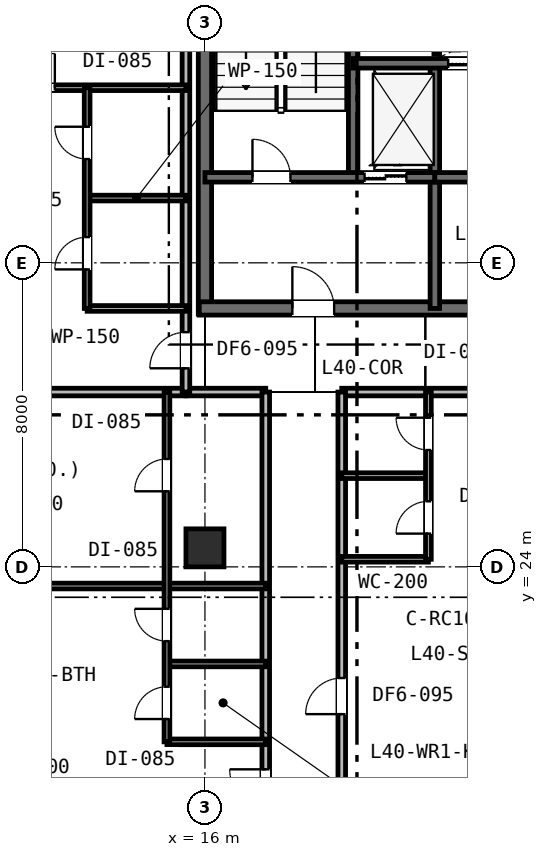
"""IFC4 building model, lengths in metres.
Left out: names, types, materials, properties, quantities, classifications, styles, units other than length and angle.
Written with IfcOpenShell. Run it as: python <this file> out.ifc"""

import sys

from ifc_helpers import new_model, si_unit, direction, frame, frame_2d, origin, origin_2d, place, context, subcontext, project, spatial, rectangle, extrude, element, fill, save


model = new_model("IFC4")
c1 = context("Model", 3, precision=1e-05, world=origin(), true_north=direction((0.0, 1.0)))
c2 = subcontext(c1, "Body", "Model", "MODEL_VIEW")
j1 = project(units=[si_unit("LENGTHUNIT", "METRE"), si_unit("PLANEANGLEUNIT", "RADIAN")], contexts=[c1])
p1 = place(None, origin())
s1 = spatial("IfcSite", under=j1, at=p1, CompositionType="ELEMENT")
p2 = place(p1, origin())
s2 = spatial("IfcBuilding", under=s1, at=p2, CompositionType="ELEMENT")
p3 = place(p2, frame((0.0, 0.0, 157.8)))
s3 = spatial("IfcBuildingStorey", under=s2, at=p3, CompositionType="ELEMENT", Elevation=157.8)
p4 = place(p3, frame((16.0, 30.65, 0.0), z_axis=(0.0, 0.0, 1.0), x_axis=(0.0, 1.0, 0.0)))
e1 = element("IfcWall", 1, at=p4, inside=s3, PredefinedType="SHEAR", context=c2, shape_type="SweptSolid", body=[
    extrude(rectangle(XDim=12.3, YDim=0.35, at=frame_2d((6.15, 0.0))), origin(), (0.0, 0.0, 1.0), 3.6),
])
p5 = place(p3, frame((15.85, 30.8, 0.0), z_axis=(0.0, 0.0, 1.0), x_axis=(1.0, 0.0, 0.0)))
e2 = element("IfcWall", 2, at=p5, inside=s3, PredefinedType="SHEAR", context=c2, shape_type="SweptSolid", body=[
    extrude(rectangle(XDim=11.2, YDim=0.35, at=frame_2d((5.6, 0.0))), origin(), (0.0, 0.0, 1.0), 3.6),
])
p6 = place(p5, frame((2.45, 0.0, 0.0)))
e3 = element("IfcOpeningElement", 3, at=p6, cuts=e2, PredefinedType="OPENING", context=c2, shape_type="SweptSolid", body=[
    extrude(rectangle(XDim=1.1, YDim=2.15, at=frame_2d((0.55, 1.075))), frame((0.0, 0.185, 0.0), z_axis=(0.0, -1.0, 0.0), x_axis=(1.0, 0.0, 0.0)), (0.0, 0.0, 1.0), 0.37),
])
p7 = place(p3, frame((19.9, 34.25, 0.0), z_axis=(0.0, 0.0, 1.0), x_axis=(0.0, 1.0, 0.0)))
e4 = element("IfcWall", 4, at=p7, inside=s3, PredefinedType="SHEAR", context=c2, shape_type="SweptSolid", body=[
    extrude(rectangle(XDim=8.65, YDim=0.25, at=frame_2d((4.325, 0.0))), origin(), (0.0, 0.0, 1.0), 3.6),
])
p8 = place(p3, frame((22.05, 30.8, 0.0), z_axis=(0.0, 0.0, 1.0), x_axis=(0.0, 1.0, 0.0)))
e5 = element("IfcWall", 5, at=p8, inside=s3, PredefinedType="SHEAR", context=c2, shape_type="SweptSolid", body=[
    extrude(rectangle(XDim=6.45, YDim=0.25, at=frame_2d((3.225, 0.0))), origin(), (0.0, 0.0, 1.0), 3.6),
])
p9 = place(p3, frame((16.0, 34.25, 0.0), z_axis=(0.0, 0.0, 1.0), x_axis=(1.0, 0.0, 0.0)))
e6 = element("IfcWall", 6, at=p9, inside=s3, PredefinedType="SHEAR", context=c2, shape_type="SweptSolid", body=[
    extrude(rectangle(XDim=6.05, YDim=0.25, at=frame_2d((3.025, 0.0))), origin(), (0.0, 0.0, 1.0), 3.6),
])
p10 = place(p9, frame((1.25, 0.0, 0.0)))
e7 = element("IfcOpeningElement", 7, at=p10, cuts=e6, PredefinedType="OPENING", context=c2, shape_type="SweptSolid", body=[
    extrude(rectangle(XDim=1.0, YDim=2.15, at=frame_2d((0.5, 1.075))), frame((0.0, 0.135, 0.0), z_axis=(0.0, -1.0, 0.0), x_axis=(1.0, 0.0, 0.0)), (0.0, 0.0, 1.0), 0.27),
])
p11 = place(p9, frame((4.2, 0.0, 0.0)))
e8 = element("IfcOpeningElement", 8, at=p11, cuts=e6, PredefinedType="OPENING", context=c2, shape_type="SweptSolid", body=[
    extrude(rectangle(XDim=1.1, YDim=2.15, at=frame_2d((0.55, 1.075))), frame((0.0, 0.135, 0.0), z_axis=(0.0, -1.0, 0.0), x_axis=(1.0, 0.0, 0.0)), (0.0, 0.0, 1.0), 0.27),
])
p12 = place(p3, frame((22.05, 34.25, 0.0), z_axis=(0.0, 0.0, 1.0), x_axis=(1.0, 0.0, 0.0)))
e9 = element("IfcWall", 9, at=p12, inside=s3, PredefinedType="SHEAR", context=c2, shape_type="SweptSolid", body=[
    extrude(rectangle(XDim=5.0, YDim=0.25, at=frame_2d((2.5, 0.0))), origin(), (0.0, 0.0, 1.0), 3.6),
])
p13 = place(p12, frame((1.95, 0.0, 0.0)))
e10 = element("IfcOpeningElement", 10, at=p13, cuts=e9, PredefinedType="OPENING", context=c2, shape_type="SweptSolid", body=[
    extrude(rectangle(XDim=1.0, YDim=2.15, at=frame_2d((0.5, 1.075))), frame((0.0, 0.135, 0.0), z_axis=(0.0, -1.0, 0.0), x_axis=(1.0, 0.0, 0.0)), (0.0, 0.0, 1.0), 0.27),
])
p14 = place(p3, frame((19.9, 37.25, 0.0), z_axis=(0.0, 0.0, 1.0), x_axis=(1.0, 0.0, 0.0)))
e11 = element("IfcWall", 11, at=p14, inside=s3, PredefinedType="SHEAR", context=c2, shape_type="SweptSolid", body=[
    extrude(rectangle(XDim=16.2, YDim=0.25, at=frame_2d((8.1, 0.0))), origin(), (0.0, 0.0, 1.0), 3.6),
])
p15 = place(p14, frame((12.55, 0.0, 0.0)))
e12 = element("IfcOpeningElement", 12, at=p15, cuts=e11, PredefinedType="OPENING", context=c2, shape_type="SweptSolid", body=[
    extrude(rectangle(XDim=0.9, YDim=2.15, at=frame_2d((0.45, 1.075))), frame((0.0, 0.135, 0.0), z_axis=(0.0, -1.0, 0.0), x_axis=(1.0, 0.0, 0.0)), (0.0, 0.0, 1.0), 0.27),
])
p16 = place(p14, frame((2.5, 0.0, 0.0)))
e13 = element("IfcOpeningElement", 13, at=p16, cuts=e11, PredefinedType="OPENING", context=c2, shape_type="SweptSolid", body=[
    extrude(rectangle(XDim=1.05, YDim=2.15, at=frame_2d((0.525, 1.075))), frame((0.0, 0.135, 0.0), z_axis=(0.0, -1.0, 0.0), x_axis=(1.0, 0.0, 0.0)), (0.0, 0.0, 1.0), 0.27),
])
p17 = place(p14, frame((4.4, 0.0, 0.0)))
e14 = element("IfcOpeningElement", 14, at=p17, cuts=e11, PredefinedType="OPENING", context=c2, shape_type="SweptSolid", body=[
    extrude(rectangle(XDim=1.05, YDim=2.15, at=frame_2d((0.525, 1.075))), frame((0.0, 0.135, 0.0), z_axis=(0.0, -1.0, 0.0), x_axis=(1.0, 0.0, 0.0)), (0.0, 0.0, 1.0), 0.27),
])
p18 = place(p14, frame((6.3, 0.0, 0.0)))
e15 = element("IfcOpeningElement", 15, at=p18, cuts=e11, PredefinedType="OPENING", context=c2, shape_type="SweptSolid", body=[
    extrude(rectangle(XDim=1.05, YDim=2.15, at=frame_2d((0.525, 1.075))), frame((0.0, 0.135, 0.0), z_axis=(0.0, -1.0, 0.0), x_axis=(1.0, 0.0, 0.0)), (0.0, 0.0, 1.0), 0.27),
])
p19 = place(p3, frame((16.0, 24.5, 0.0), z_axis=(0.0, 0.0, 1.0), x_axis=(1.0, 0.0, 0.0)))
e16 = element("IfcColumn", 16, at=p19, inside=s3, PredefinedType="COLUMN", context=c2, shape_type="SweptSolid", body=[
    extrude(rectangle(XDim=1.0, YDim=1.0, at=origin_2d()), origin(), (0.0, 0.0, 1.0), 3.6),
])
p20 = place(p3, frame((22.1, 37.49, 0.0), z_axis=(0.0, 0.0, 1.0), x_axis=(0.0, 1.0, 0.0)))
e17 = element("IfcWall", 17, at=p20, inside=s3, PredefinedType="PLUMBINGWALL", context=c2, shape_type="SweptSolid", body=[
    extrude(rectangle(XDim=2.56, YDim=0.15, at=frame_2d((1.28, 0.0))), origin(), (0.0, 0.0, 1.0), 3.33),
])
p21 = place(p3, frame((5.1, 28.6, 0.0), z_axis=(0.0, 0.0, 1.0), x_axis=(1.0, 0.0, 0.0)))
e18 = element("IfcWall", 18, at=p21, inside=s3, PredefinedType="PARTITIONING", context=c2, shape_type="SweptSolid", body=[
    extrude(rectangle(XDim=10.4, YDim=0.2, at=frame_2d((5.2, 0.0))), origin(), (0.0, 0.0, 1.0), 2.93),
])
p22 = place(p3, frame((15.5, 28.6, 0.0), z_axis=(0.0, 0.0, 1.0), x_axis=(1.0, 0.0, 0.0)))
e19 = element("IfcWall", 19, at=p22, inside=s3, PredefinedType="PARTITIONING", context=c2, shape_type="SweptSolid", body=[
    extrude(rectangle(XDim=2.1, YDim=0.2, at=frame_2d((1.05, 0.0))), origin(), (0.0, 0.0, 1.0), 2.93),
])
p23 = place(p3, frame((19.6, 28.6, 0.0), z_axis=(0.0, 0.0, 1.0), x_axis=(1.0, 0.0, 0.0)))
e20 = element("IfcWall", 20, at=p23, inside=s3, PredefinedType="PARTITIONING", context=c2, shape_type="SweptSolid", body=[
    extrude(rectangle(XDim=31.3, YDim=0.2, at=frame_2d((15.65, 0.0))), origin(), (0.0, 0.0, 1.0), 2.93),
])
p24 = place(p23, frame((5.445, 0.0, 0.0)))
e21 = element("IfcOpeningElement", 21, at=p24, cuts=e20, PredefinedType="OPENING", context=c2, shape_type="SweptSolid", body=[
    extrude(rectangle(XDim=0.95, YDim=2.15, at=frame_2d((0.475, 1.075))), frame((0.0, 0.11, 0.0), z_axis=(0.0, -1.0, 0.0), x_axis=(1.0, 0.0, 0.0)), (0.0, 0.0, 1.0), 0.22),
])
p25 = place(p23, frame((13.35, 0.0, 0.0)))
e22 = element("IfcOpeningElement", 22, at=p25, cuts=e20, PredefinedType="OPENING", context=c2, shape_type="SweptSolid", body=[
    extrude(rectangle(XDim=0.95, YDim=2.15, at=frame_2d((0.475, 1.075))), frame((0.0, 0.11, 0.0), z_axis=(0.0, -1.0, 0.0), x_axis=(1.0, 0.0, 0.0)), (0.0, 0.0, 1.0), 0.22),
])
p26 = place(p23, frame((21.925, 0.0, 0.0)))
e23 = element("IfcOpeningElement", 23, at=p26, cuts=e20, PredefinedType="OPENING", context=c2, shape_type="SweptSolid", body=[
    extrude(rectangle(XDim=0.95, YDim=2.15, at=frame_2d((0.475, 1.075))), frame((0.0, 0.11, 0.0), z_axis=(0.0, -1.0, 0.0), x_axis=(1.0, 0.0, 0.0)), (0.0, 0.0, 1.0), 0.22),
])
p27 = place(p3, frame((15.5, 28.6, 0.0), z_axis=(0.0, 0.0, 1.0), x_axis=(0.0, 1.0, 0.0)))
e24 = element("IfcWall", 24, at=p27, inside=s3, PredefinedType="PARTITIONING", context=c2, shape_type="SweptSolid", body=[
    extrude(rectangle(XDim=14.3, YDim=0.2, at=frame_2d((7.15, 0.0))), origin(), (0.0, 0.0, 1.0), 2.93),
])
p28 = place(p27, frame((0.625, 0.0, 0.0)))
e25 = element("IfcOpeningElement", 25, at=p28, cuts=e24, PredefinedType="OPENING", context=c2, shape_type="SweptSolid", body=[
    extrude(rectangle(XDim=0.95, YDim=2.15, at=frame_2d((0.475, 1.075))), frame((0.0, 0.11, 0.0), z_axis=(0.0, -1.0, 0.0), x_axis=(1.0, 0.0, 0.0)), (0.0, 0.0, 1.0), 0.22),
])
p29 = place(p3, frame((12.9, 30.8, 0.0), z_axis=(0.0, 0.0, 1.0), x_axis=(1.0, 0.0, 0.0)))
e26 = element("IfcWall", 26, at=p29, inside=s3, PredefinedType="PARTITIONING", context=c2, shape_type="SweptSolid", body=[
    extrude(rectangle(XDim=2.6, YDim=0.15, at=frame_2d((1.3, 0.0))), origin(), (0.0, 0.0, 1.0), 2.93),
])
p30 = place(p3, frame((12.9, 33.704, 0.0), z_axis=(0.0, 0.0, 1.0), x_axis=(1.0, 0.0, 0.0)))
e27 = element("IfcWall", 27, at=p30, inside=s3, PredefinedType="PARTITIONING", context=c2, shape_type="SweptSolid", body=[
    extrude(rectangle(XDim=2.6, YDim=0.15, at=frame_2d((1.3, 0.0))), origin(), (0.0, 0.0, 1.0), 3.33),
])
p31 = place(p3, frame((5.1, 36.608, 0.0), z_axis=(0.0, 0.0, 1.0), x_axis=(1.0, 0.0, 0.0)))
e28 = element("IfcWall", 28, at=p31, inside=s3, PredefinedType="PARTITIONING", context=c2, shape_type="SweptSolid", body=[
    extrude(rectangle(XDim=10.4, YDim=0.15, at=frame_2d((5.2, 0.0))), origin(), (0.0, 0.0, 1.0), 3.01),
])
p32 = place(p31, frame((2.15, 0.0, 0.0)))
e29 = element("IfcOpeningElement", 29, at=p32, cuts=e28, PredefinedType="OPENING", context=c2, shape_type="SweptSolid", body=[
    extrude(rectangle(XDim=0.9, YDim=2.15, at=frame_2d((0.45, 1.075))), frame((0.0, 0.085, 0.0), z_axis=(0.0, -1.0, 0.0), x_axis=(1.0, 0.0, 0.0)), (0.0, 0.0, 1.0), 0.17),
])
p33 = place(p31, frame((6.05, 0.0, 0.0)))
e30 = element("IfcOpeningElement", 30, at=p33, cuts=e28, PredefinedType="OPENING", context=c2, shape_type="SweptSolid", body=[
    extrude(rectangle(XDim=0.9, YDim=2.15, at=frame_2d((0.45, 1.075))), frame((0.0, 0.085, 0.0), z_axis=(0.0, -1.0, 0.0), x_axis=(1.0, 0.0, 0.0)), (0.0, 0.0, 1.0), 0.17),
])
p34 = place(p3, frame((12.9, 30.8, 0.0), z_axis=(0.0, 0.0, 1.0), x_axis=(0.0, 1.0, 0.0)))
e31 = element("IfcWall", 31, at=p34, inside=s3, PredefinedType="PARTITIONING", context=c2, shape_type="SweptSolid", body=[
    extrude(rectangle(XDim=5.808, YDim=0.15, at=frame_2d((2.904, 0.0))), origin(), (0.0, 0.0, 1.0), 2.93),
])
p35 = place(p34, frame((1.027, 0.0, 0.0)))
e32 = element("IfcOpeningElement", 32, at=p35, cuts=e31, PredefinedType="OPENING", context=c2, shape_type="SweptSolid", body=[
    extrude(rectangle(XDim=0.85, YDim=2.15, at=frame_2d((0.425, 1.075))), frame((0.0, 0.085, 0.0), z_axis=(0.0, -1.0, 0.0), x_axis=(1.0, 0.0, 0.0)), (0.0, 0.0, 1.0), 0.17),
])
p36 = place(p34, frame((3.931, 0.0, 0.0)))
e33 = element("IfcOpeningElement", 33, at=p36, cuts=e31, PredefinedType="OPENING", context=c2, shape_type="SweptSolid", body=[
    extrude(rectangle(XDim=0.85, YDim=2.15, at=frame_2d((0.425, 1.075))), frame((0.0, 0.085, 0.0), z_axis=(0.0, -1.0, 0.0), x_axis=(1.0, 0.0, 0.0)), (0.0, 0.0, 1.0), 0.17),
])
p37 = place(p3, frame((17.6, 17.0, 0.0), z_axis=(0.0, 0.0, 1.0), x_axis=(0.0, 1.0, 0.0)))
e34 = element("IfcWall", 34, at=p37, inside=s3, PredefinedType="PARTITIONING", context=c2, shape_type="SweptSolid", body=[
    extrude(rectangle(XDim=11.6, YDim=0.2, at=frame_2d((5.8, 0.0))), origin(), (0.0, 0.0, 1.0), 2.93),
])
p38 = place(p37, frame((0.723, 0.0, 0.0)))
e35 = element("IfcOpeningElement", 35, at=p38, cuts=e34, PredefinedType="OPENING", context=c2, shape_type="SweptSolid", body=[
    extrude(rectangle(XDim=0.95, YDim=2.15, at=frame_2d((0.475, 1.075))), frame((0.0, 0.11, 0.0), z_axis=(0.0, -1.0, 0.0), x_axis=(1.0, 0.0, 0.0)), (0.0, 0.0, 1.0), 0.22),
])
for number, where, z_axis, x_axis in (
    (36, (15.0, 19.396, 0.0), (0.0, 0.0, 1.0), (1.0, 0.0, 0.0)),
    (37, (15.0, 21.446, 0.0), (0.0, 0.0, 1.0), (1.0, 0.0, 0.0)),
):
    element("IfcWall", number, at=place(p3, frame(where, z_axis=z_axis, x_axis=x_axis)), inside=s3, PredefinedType="PARTITIONING", context=c2, shape_type="SweptSolid", body=[
        extrude(rectangle(XDim=2.6, YDim=0.15, at=frame_2d((1.3, 0.0))), origin(), (0.0, 0.0, 1.0), 2.93),
    ])
p39 = place(p3, frame((5.1, 23.496, 0.0), z_axis=(0.0, 0.0, 1.0), x_axis=(1.0, 0.0, 0.0)))
e38 = element("IfcWall", 38, at=p39, inside=s3, PredefinedType="PARTITIONING", context=c2, shape_type="SweptSolid", body=[
    extrude(rectangle(XDim=12.5, YDim=0.15, at=frame_2d((6.25, 0.0))), origin(), (0.0, 0.0, 1.0), 2.93),
])
p40 = place(p39, frame((4.692, 0.0, 0.0)))
e39 = element("IfcOpeningElement", 39, at=p40, cuts=e38, PredefinedType="OPENING", context=c2, shape_type="SweptSolid", body=[
    extrude(rectangle(XDim=0.9, YDim=2.15, at=frame_2d((0.45, 1.075))), frame((0.0, 0.085, 0.0), z_axis=(0.0, -1.0, 0.0), x_axis=(1.0, 0.0, 0.0)), (0.0, 0.0, 1.0), 0.17),
])
p41 = place(p3, frame((15.0, 19.396, 0.0), z_axis=(0.0, 0.0, 1.0), x_axis=(0.0, 1.0, 0.0)))
e40 = element("IfcWall", 40, at=p41, inside=s3, PredefinedType="PARTITIONING", context=c2, shape_type="SweptSolid", body=[
    extrude(rectangle(XDim=9.204, YDim=0.15, at=frame_2d((4.602, 0.0))), origin(), (0.0, 0.0, 1.0), 2.93),
])
p42 = place(p41, frame((0.6, 0.0, 0.0)))
e41 = element("IfcOpeningElement", 41, at=p42, cuts=e40, PredefinedType="OPENING", context=c2, shape_type="SweptSolid", body=[
    extrude(rectangle(XDim=0.85, YDim=2.15, at=frame_2d((0.425, 1.075))), frame((0.0, 0.085, 0.0), z_axis=(0.0, -1.0, 0.0), x_axis=(1.0, 0.0, 0.0)), (0.0, 0.0, 1.0), 0.17),
])
p43 = place(p41, frame((2.65, 0.0, 0.0)))
e42 = element("IfcOpeningElement", 42, at=p43, cuts=e40, PredefinedType="OPENING", context=c2, shape_type="SweptSolid", body=[
    extrude(rectangle(XDim=0.85, YDim=2.15, at=frame_2d((0.425, 1.075))), frame((0.0, 0.085, 0.0), z_axis=(0.0, -1.0, 0.0), x_axis=(1.0, 0.0, 0.0)), (0.0, 0.0, 1.0), 0.17),
])
p44 = place(p41, frame((6.593, 0.0, 0.0)))
e43 = element("IfcOpeningElement", 43, at=p44, cuts=e40, PredefinedType="OPENING", context=c2, shape_type="SweptSolid", body=[
    extrude(rectangle(XDim=0.85, YDim=2.15, at=frame_2d((0.425, 1.075))), frame((0.0, 0.085, 0.0), z_axis=(0.0, -1.0, 0.0), x_axis=(1.0, 0.0, 0.0)), (0.0, 0.0, 1.0), 0.17),
])
p45 = place(p3, frame((19.6, 17.0, 0.0), z_axis=(0.0, 0.0, 1.0), x_axis=(0.0, 1.0, 0.0)))
e44 = element("IfcWall", 44, at=p45, inside=s3, PredefinedType="PARTITIONING", context=c2, shape_type="SweptSolid", body=[
    extrude(rectangle(XDim=11.6, YDim=0.2, at=frame_2d((5.8, 0.0))), origin(), (0.0, 0.0, 1.0), 2.93),
])
p46 = place(p45, frame((3.125, 0.0, 0.0)))
e45 = element("IfcOpeningElement", 45, at=p46, cuts=e44, PredefinedType="OPENING", context=c2, shape_type="SweptSolid", body=[
    extrude(rectangle(XDim=0.95, YDim=2.15, at=frame_2d((0.475, 1.075))), frame((0.0, 0.11, 0.0), z_axis=(0.0, -1.0, 0.0), x_axis=(1.0, 0.0, 0.0)), (0.0, 0.0, 1.0), 0.22),
])
p47 = place(p3, frame((19.6, 24.2, 0.0), z_axis=(0.0, 0.0, 1.0), x_axis=(1.0, 0.0, 0.0)))
e46 = element("IfcWall", 46, at=p47, inside=s3, PredefinedType="PARTITIONING", context=c2, shape_type="SweptSolid", body=[
    extrude(rectangle(XDim=2.28, YDim=0.15, at=frame_2d((1.14, 0.0))), origin(), (0.0, 0.0, 1.0), 2.93),
])
p48 = place(p3, frame((19.6, 26.4, 0.0), z_axis=(0.0, 0.0, 1.0), x_axis=(1.0, 0.0, 0.0)))
e47 = element("IfcWall", 47, at=p48, inside=s3, PredefinedType="PARTITIONING", context=c2, shape_type="SweptSolid", body=[
    extrude(rectangle(XDim=2.28, YDim=0.15, at=frame_2d((1.14, 0.0))), origin(), (0.0, 0.0, 1.0), 2.96),
])
p49 = place(p3, frame((21.88, 24.2, 0.0), z_axis=(0.0, 0.0, 1.0), x_axis=(0.0, 1.0, 0.0)))
e48 = element("IfcWall", 48, at=p49, inside=s3, PredefinedType="PARTITIONING", context=c2, shape_type="SweptSolid", body=[
    extrude(rectangle(XDim=4.4, YDim=0.15, at=frame_2d((2.2, 0.0))), origin(), (0.0, 0.0, 1.0), 2.93),
])
p50 = place(p49, frame((0.675, 0.0, 0.0)))
e49 = element("IfcOpeningElement", 49, at=p50, cuts=e48, PredefinedType="OPENING", context=c2, shape_type="SweptSolid", body=[
    extrude(rectangle(XDim=0.85, YDim=2.15, at=frame_2d((0.425, 1.075))), frame((0.0, 0.085, 0.0), z_axis=(0.0, -1.0, 0.0), x_axis=(1.0, 0.0, 0.0)), (0.0, 0.0, 1.0), 0.17),
])
p51 = place(p49, frame((2.875, 0.0, 0.0)))
e50 = element("IfcOpeningElement", 50, at=p51, cuts=e48, PredefinedType="OPENING", context=c2, shape_type="SweptSolid", body=[
    extrude(rectangle(XDim=0.85, YDim=2.15, at=frame_2d((0.425, 1.075))), frame((0.0, 0.085, 0.0), z_axis=(0.0, -1.0, 0.0), x_axis=(1.0, 0.0, 0.0)), (0.0, 0.0, 1.0), 0.17),
])
p52 = place(p10, origin())
e51 = element("IfcDoor", 51, at=p52, inside=s3, OperationType="SINGLE_SWING_LEFT", PredefinedType="DOOR", context=c2, shape_type="SweptSolid", body=[
    extrude(rectangle(XDim=1.0, YDim=2.15, at=frame_2d((0.5, 1.075))), frame((0.0, 0.025, 0.0), z_axis=(0.0, -1.0, 0.0), x_axis=(1.0, 0.0, 0.0)), (0.0, 0.0, 1.0), 0.05),
])
fill(e7, e51)
p53 = place(p6, origin())
e52 = element("IfcDoor", 52, at=p53, inside=s3, OperationType="SINGLE_SWING_LEFT", PredefinedType="DOOR", context=c2, shape_type="SweptSolid", body=[
    extrude(rectangle(XDim=1.1, YDim=2.15, at=frame_2d((0.55, 1.075))), frame((0.0, 0.025, 0.0), z_axis=(0.0, -1.0, 0.0), x_axis=(1.0, 0.0, 0.0)), (0.0, 0.0, 1.0), 0.05),
])
fill(e3, e52)
p54 = place(p28, origin())
e53 = element("IfcDoor", 53, at=p54, inside=s3, OperationType="SINGLE_SWING_LEFT", PredefinedType="DOOR", context=c2, shape_type="SweptSolid", body=[
    extrude(rectangle(XDim=0.95, YDim=2.15, at=frame_2d((0.475, 1.075))), frame((0.0, 0.025, 0.0), z_axis=(0.0, -1.0, 0.0), x_axis=(1.0, 0.0, 0.0)), (0.0, 0.0, 1.0), 0.05),
])
fill(e25, e53)
p55 = place(p35, origin())
e54 = element("IfcDoor", 54, at=p55, inside=s3, OperationType="SINGLE_SWING_LEFT", PredefinedType="DOOR", context=c2, shape_type="SweptSolid", body=[
    extrude(rectangle(XDim=0.85, YDim=2.15, at=frame_2d((0.425, 1.075))), frame((0.0, 0.025, 0.0), z_axis=(0.0, -1.0, 0.0), x_axis=(1.0, 0.0, 0.0)), (0.0, 0.0, 1.0), 0.05),
])
fill(e32, e54)
p56 = place(p36, origin())
e55 = element("IfcDoor", 55, at=p56, inside=s3, OperationType="SINGLE_SWING_RIGHT", PredefinedType="DOOR", context=c2, shape_type="SweptSolid", body=[
    extrude(rectangle(XDim=0.85, YDim=2.15, at=frame_2d((0.425, 1.075))), frame((0.0, 0.025, 0.0), z_axis=(0.0, -1.0, 0.0), x_axis=(1.0, 0.0, 0.0)), (0.0, 0.0, 1.0), 0.05),
])
fill(e33, e55)
p57 = place(p33, origin())
e56 = element("IfcDoor", 56, at=p57, inside=s3, OperationType="SINGLE_SWING_RIGHT", PredefinedType="DOOR", context=c2, shape_type="SweptSolid", body=[
    extrude(rectangle(XDim=0.9, YDim=2.15, at=frame_2d((0.45, 1.075))), frame((0.0, 0.025, 0.0), z_axis=(0.0, -1.0, 0.0), x_axis=(1.0, 0.0, 0.0)), (0.0, 0.0, 1.0), 0.05),
])
fill(e30, e56)
p58 = place(p38, origin())
e57 = element("IfcDoor", 57, at=p58, inside=s3, OperationType="SINGLE_SWING_RIGHT", PredefinedType="DOOR", context=c2, shape_type="SweptSolid", body=[
    extrude(rectangle(XDim=0.95, YDim=2.15, at=frame_2d((0.475, 1.075))), frame((0.0, 0.025, 0.0), z_axis=(0.0, -1.0, 0.0), x_axis=(1.0, 0.0, 0.0)), (0.0, 0.0, 1.0), 0.05),
])
fill(e35, e57)
p59 = place(p42, origin())
e58 = element("IfcDoor", 58, at=p59, inside=s3, OperationType="SINGLE_SWING_LEFT", PredefinedType="DOOR", context=c2, shape_type="SweptSolid", body=[
    extrude(rectangle(XDim=0.85, YDim=2.15, at=frame_2d((0.425, 1.075))), frame((0.0, 0.025, 0.0), z_axis=(0.0, -1.0, 0.0), x_axis=(1.0, 0.0, 0.0)), (0.0, 0.0, 1.0), 0.05),
])
fill(e41, e58)
p60 = place(p43, origin())
e59 = element("IfcDoor", 59, at=p60, inside=s3, OperationType="SINGLE_SWING_RIGHT", PredefinedType="DOOR", context=c2, shape_type="SweptSolid", body=[
    extrude(rectangle(XDim=0.85, YDim=2.15, at=frame_2d((0.425, 1.075))), frame((0.0, 0.025, 0.0), z_axis=(0.0, -1.0, 0.0), x_axis=(1.0, 0.0, 0.0)), (0.0, 0.0, 1.0), 0.05),
])
fill(e42, e59)
p61 = place(p44, origin())
e60 = element("IfcDoor", 60, at=p61, inside=s3, OperationType="SINGLE_SWING_LEFT", PredefinedType="DOOR", context=c2, shape_type="SweptSolid", body=[
    extrude(rectangle(XDim=0.85, YDim=2.15, at=frame_2d((0.425, 1.075))), frame((0.0, 0.025, 0.0), z_axis=(0.0, -1.0, 0.0), x_axis=(1.0, 0.0, 0.0)), (0.0, 0.0, 1.0), 0.05),
])
fill(e43, e60)
p62 = place(p46, origin())
e61 = element("IfcDoor", 61, at=p62, inside=s3, OperationType="SINGLE_SWING_LEFT", PredefinedType="DOOR", context=c2, shape_type="SweptSolid", body=[
    extrude(rectangle(XDim=0.95, YDim=2.15, at=frame_2d((0.475, 1.075))), frame((0.0, 0.025, 0.0), z_axis=(0.0, -1.0, 0.0), x_axis=(1.0, 0.0, 0.0)), (0.0, 0.0, 1.0), 0.05),
])
fill(e45, e61)
p63 = place(p50, origin())
e62 = element("IfcDoor", 62, at=p63, inside=s3, OperationType="SINGLE_SWING_LEFT", PredefinedType="DOOR", context=c2, shape_type="SweptSolid", body=[
    extrude(rectangle(XDim=0.85, YDim=2.15, at=frame_2d((0.425, 1.075))), frame((0.0, 0.025, 0.0), z_axis=(0.0, -1.0, 0.0), x_axis=(1.0, 0.0, 0.0)), (0.0, 0.0, 1.0), 0.05),
])
fill(e49, e62)
p64 = place(p51, origin())
e63 = element("IfcDoor", 63, at=p64, inside=s3, OperationType="SINGLE_SWING_RIGHT", PredefinedType="DOOR", context=c2, shape_type="SweptSolid", body=[
    extrude(rectangle(XDim=0.85, YDim=2.15, at=frame_2d((0.425, 1.075))), frame((0.0, 0.025, 0.0), z_axis=(0.0, -1.0, 0.0), x_axis=(1.0, 0.0, 0.0)), (0.0, 0.0, 1.0), 0.05),
])
fill(e50, e63)
p65 = place(p11, origin())
e64 = element("IfcDoor", 64, at=p65, inside=s3, OperationType="DOUBLE_DOOR_SLIDING", PredefinedType="DOOR", context=c2, shape_type="SweptSolid", body=[
    extrude(rectangle(XDim=1.1, YDim=2.15, at=frame_2d((0.55, 1.075))), frame((0.0, 0.025, 0.0), z_axis=(0.0, -1.0, 0.0), x_axis=(1.0, 0.0, 0.0)), (0.0, 0.0, 1.0), 0.05),
])
fill(e8, e64)
p66 = place(p16, origin())
e65 = element("IfcDoor", 65, at=p66, inside=s3, OperationType="DOUBLE_DOOR_SLIDING", PredefinedType="DOOR", context=c2, shape_type="SweptSolid", body=[
    extrude(rectangle(XDim=1.05, YDim=2.15, at=frame_2d((0.525, 1.075))), frame((0.0, 0.025, 0.0), z_axis=(0.0, -1.0, 0.0), x_axis=(1.0, 0.0, 0.0)), (0.0, 0.0, 1.0), 0.05),
])
fill(e13, e65)
save(model, sys.argv[1])
